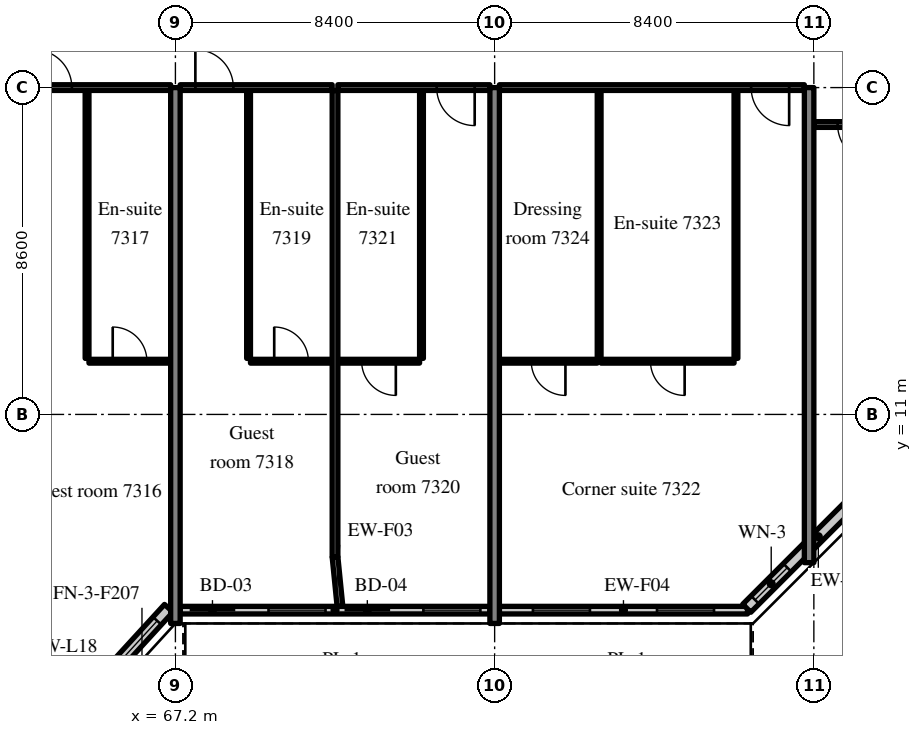
"""IFC4 building model, lengths in metres.
Left out: names, types, materials, properties, quantities, classifications, styles, units other than length and angle.
Written with IfcOpenShell. Run it as: python <this file> out.ifc"""

import sys

from ifc_helpers import new_model, si_unit, direction, frame, frame_2d, origin, place, context, subcontext, project, spatial, rectangle, extrude, source, transform, mapped, element, fill, save


model = new_model("IFC4")
c1 = context("Model", 3, precision=1e-05, world=origin(), true_north=direction((0.0, 1.0)))
c2 = subcontext(c1, "Body", "Model", "MODEL_VIEW")
j1 = project(units=[si_unit("LENGTHUNIT", "METRE"), si_unit("PLANEANGLEUNIT", "RADIAN")], contexts=[c1])
p1 = place(None, origin())
s1 = spatial("IfcSite", under=j1, at=p1, CompositionType="ELEMENT")
p2 = place(p1, origin())
s2 = spatial("IfcBuilding", under=s1, at=p2, CompositionType="ELEMENT")
p3 = place(p2, frame((0.0, 0.0, 305.7)))
s3 = spatial("IfcBuildingStorey", under=s2, at=p3, CompositionType="ELEMENT", Elevation=305.7)
m1 = source(origin(), c2, "Body", "SweptSolid", [
    extrude(rectangle(XDim=14.1, YDim=0.25, at=frame_2d((7.05, 0.0))), origin(), (0.0, 0.0, 1.0), 3.72),
])
for number, where, z_axis, x_axis in (
    (1, (67.2, 5.5, 0.0), (0.0, 0.0, 1.0), (0.0, 1.0, 0.0)),
    (2, (75.6, 5.5, 0.0), (0.0, 0.0, 1.0), (0.0, 1.0, 0.0)),
):
    element("IfcWall", number, at=place(p3, frame(where, z_axis=z_axis, x_axis=x_axis)), inside=s3, PredefinedType="SHEAR", context=c2, shape_type="MappedRepresentation", body=[
        mapped(m1, transform((0.0, 0.0, 0.0), scale=1.0)),
    ])
m2 = source(origin(), c2, "Body", "SweptSolid", [
    extrude(rectangle(XDim=12.5, YDim=0.25, at=frame_2d((6.25, 0.0))), origin(), (0.0, 0.0, 1.0), 3.72),
])
p4 = place(p3, frame((83.875, 7.1, 0.0), z_axis=(0.0, 0.0, 1.0), x_axis=(0.0, 1.0, 0.0)))
e3 = element("IfcWall", 3, at=p4, inside=s3, PredefinedType="SHEAR", context=c2, shape_type="MappedRepresentation", body=[
    mapped(m2, transform((0.0, 0.0, 0.0), scale=1.0)),
])
m3 = source(origin(), c2, "Body", "SweptSolid", [
    extrude(rectangle(XDim=2.398, YDim=0.3, at=frame_2d((1.199, 0.0))), origin(), (0.0, 0.0, 1.0), 3.72),
])
p5 = place(p3, frame((65.404, 4.131, 0.0), z_axis=(0.0, 0.0, 1.0), x_axis=(0.675374189419, 0.737475222815, 0.0)))
e4 = element("IfcWall", 4, at=p5, inside=s3, PredefinedType="SOLIDWALL", context=c2, shape_type="MappedRepresentation", body=[
    mapped(m3, transform((0.0, 0.0, 0.0), scale=1.0)),
])
m4 = source(origin(), c2, "Body", "SweptSolid", [
    extrude(rectangle(XDim=1.5, YDim=2.0, at=frame_2d((0.75, 1.0))), frame((0.0, 0.16, 0.0), z_axis=(0.0, -1.0, 0.0), x_axis=(1.0, 0.0, 0.0)), (0.0, 0.0, 1.0), 0.32),
])
p6 = place(p5, frame((0.449, 0.0, 0.9)))
e5 = element("IfcOpeningElement", 5, at=p6, cuts=e4, PredefinedType="OPENING", context=c2, shape_type="MappedRepresentation", body=[
    mapped(m4, transform((0.0, 0.0, 0.0), scale=1.0)),
])
m5 = source(origin(), c2, "Body", "SweptSolid", [
    extrude(rectangle(XDim=8.15, YDim=0.2, at=frame_2d((4.075, 0.0))), origin(), (0.0, 0.0, 1.0), 3.17),
])
p7 = place(p3, frame((67.325, 5.85, 0.0), z_axis=(0.0, 0.0, 1.0), x_axis=(1.0, 0.0, 0.0)))
e6 = element("IfcWall", 6, at=p7, inside=s3, PredefinedType="SOLIDWALL", context=c2, shape_type="MappedRepresentation", body=[
    mapped(m5, transform((0.0, 0.0, 0.0), scale=1.0)),
])
m6 = source(origin(), c2, "Body", "SweptSolid", [
    extrude(rectangle(XDim=1.2, YDim=2.4, at=frame_2d((0.6, 1.2))), frame((0.0, 0.11, 0.0), z_axis=(0.0, -1.0, 0.0), x_axis=(1.0, 0.0, 0.0)), (0.0, 0.0, 1.0), 0.22),
])
p8 = place(p7, frame((0.25, 0.0, 0.0)))
e7 = element("IfcOpeningElement", 7, at=p8, cuts=e6, PredefinedType="OPENING", context=c2, shape_type="MappedRepresentation", body=[
    mapped(m6, transform((0.0, 0.0, 0.0), scale=1.0)),
])
m7 = source(origin(), c2, "Body", "SweptSolid", [
    extrude(rectangle(XDim=1.5, YDim=1.5, at=frame_2d((0.75, 0.75))), frame((0.0, 0.11, 0.0), z_axis=(0.0, -1.0, 0.0), x_axis=(1.0, 0.0, 0.0)), (0.0, 0.0, 1.0), 0.22),
])
p9 = place(p7, frame((2.325, 0.0, 0.9)))
e8 = element("IfcOpeningElement", 8, at=p9, cuts=e6, PredefinedType="OPENING", context=c2, shape_type="MappedRepresentation", body=[
    mapped(m7, transform((0.0, 0.0, 0.0), scale=1.0)),
])
p10 = place(p7, frame((4.325, 0.0, 0.0)))
e9 = element("IfcOpeningElement", 9, at=p10, cuts=e6, PredefinedType="OPENING", context=c2, shape_type="MappedRepresentation", body=[
    mapped(m6, transform((0.0, 0.0, 0.0), scale=1.0)),
])
p11 = place(p7, frame((6.4, 0.0, 0.9)))
e10 = element("IfcOpeningElement", 10, at=p11, cuts=e6, PredefinedType="OPENING", context=c2, shape_type="MappedRepresentation", body=[
    mapped(m7, transform((0.0, 0.0, 0.0), scale=1.0)),
])
m8 = source(origin(), c2, "Body", "SweptSolid", [
    extrude(rectangle(XDim=6.53, YDim=0.2, at=frame_2d((3.265, 0.0))), origin(), (0.0, 0.0, 1.0), 3.17),
])
p12 = place(p3, frame((75.725, 5.85, 0.0), z_axis=(0.0, 0.0, 1.0), x_axis=(1.0, 0.0, 0.0)))
e11 = element("IfcWall", 11, at=p12, inside=s3, PredefinedType="SOLIDWALL", context=c2, shape_type="MappedRepresentation", body=[
    mapped(m8, transform((0.0, 0.0, 0.0), scale=1.0)),
])
p13 = place(p12, frame((0.883, 0.0, 0.9)))
e12 = element("IfcOpeningElement", 12, at=p13, cuts=e11, PredefinedType="OPENING", context=c2, shape_type="MappedRepresentation", body=[
    mapped(m7, transform((0.0, 0.0, 0.0), scale=1.0)),
])
p14 = place(p12, frame((4.147, 0.0, 0.9)))
e13 = element("IfcOpeningElement", 13, at=p14, cuts=e11, PredefinedType="OPENING", context=c2, shape_type="MappedRepresentation", body=[
    mapped(m7, transform((0.0, 0.0, 0.0), scale=1.0)),
])
m9 = source(origin(), c2, "Body", "SweptSolid", [
    extrude(rectangle(XDim=5.326, YDim=0.3, at=frame_2d((2.663, 0.0))), origin(), (0.0, 0.0, 1.0), 3.72),
])
p15 = place(p3, frame((82.234, 5.9, 0.0), z_axis=(0.0, 0.0, 1.0), x_axis=(0.707083859269, 0.707129702361, 0.0)))
e14 = element("IfcWall", 14, at=p15, inside=s3, PredefinedType="SOLIDWALL", context=c2, shape_type="MappedRepresentation", body=[
    mapped(m9, transform((0.0, 0.0, 0.0), scale=1.0)),
])
m10 = source(origin(), c2, "Body", "SweptSolid", [
    extrude(rectangle(XDim=1.2, YDim=1.5, at=frame_2d((0.6, 0.75))), frame((0.0, 0.16, 0.0), z_axis=(0.0, -1.0, 0.0), x_axis=(1.0, 0.0, 0.0)), (0.0, 0.0, 1.0), 0.32),
])
p16 = place(p15, frame((0.31, 0.0, 0.9)))
e15 = element("IfcOpeningElement", 15, at=p16, cuts=e14, PredefinedType="OPENING", context=c2, shape_type="MappedRepresentation", body=[
    mapped(m10, transform((0.0, 0.0, 0.0), scale=1.0)),
])
m11 = source(origin(), c2, "Body", "SweptSolid", [
    extrude(rectangle(XDim=7.05, YDim=0.1, at=frame_2d((3.525, 0.0))), origin(), (0.0, 0.0, 1.0), 3.72),
])
p17 = place(p3, frame((64.875, 12.475, 0.0), z_axis=(0.0, 0.0, 1.0), x_axis=(0.0, 1.0, 0.0)))
e16 = element("IfcWall", 16, at=p17, inside=s3, PredefinedType="PARTITIONING", context=c2, shape_type="MappedRepresentation", body=[
    mapped(m11, transform((0.0, 0.0, 0.0), scale=1.0)),
])
m12 = source(origin(), c2, "Body", "SweptSolid", [
    extrude(rectangle(XDim=2.15, YDim=0.1, at=frame_2d((1.075, 0.0))), origin(), (0.0, 0.0, 1.0), 3.72),
])
p18 = place(p3, frame((64.925, 12.4, 0.0), z_axis=(0.0, 0.0, 1.0), x_axis=(1.0, 0.0, 0.0)))
e17 = element("IfcWall", 17, at=p18, inside=s3, PredefinedType="PARTITIONING", context=c2, shape_type="MappedRepresentation", body=[
    mapped(m12, transform((0.0, 0.0, 0.0), scale=1.0)),
])
m13 = source(origin(), c2, "Body", "SweptSolid", [
    extrude(rectangle(XDim=0.9, YDim=2.1, at=frame_2d((0.45, 1.05))), frame((0.0, 0.06, 0.0), z_axis=(0.0, -1.0, 0.0), x_axis=(1.0, 0.0, 0.0)), (0.0, 0.0, 1.0), 0.12),
])
p19 = place(p18, frame((0.625, 0.0, 0.0)))
e18 = element("IfcOpeningElement", 18, at=p19, cuts=e17, PredefinedType="OPENING", context=c2, shape_type="MappedRepresentation", body=[
    mapped(m13, transform((0.0, 0.0, 0.0), scale=1.0)),
])
m14 = source(origin(), c2, "Body", "SweptSolid", [
    extrude(rectangle(XDim=4.0, YDim=0.15, at=frame_2d((2.0, 0.0))), origin(), (0.0, 0.0, 1.0), 3.02),
])
p20 = place(p3, frame((63.075, 19.6, 0.0), z_axis=(0.0, 0.0, 1.0), x_axis=(1.0, 0.0, 0.0)))
e19 = element("IfcWall", 19, at=p20, inside=s3, PredefinedType="PARTITIONING", context=c2, shape_type="MappedRepresentation", body=[
    mapped(m14, transform((0.0, 0.0, 0.0), scale=1.0)),
])
m15 = source(origin(), c2, "Body", "SweptSolid", [
    extrude(rectangle(XDim=1.0, YDim=2.1, at=frame_2d((0.5, 1.05))), frame((0.0, 0.085, 0.0), z_axis=(0.0, -1.0, 0.0), x_axis=(1.0, 0.0, 0.0)), (0.0, 0.0, 1.0), 0.17),
])
p21 = place(p20, frame((0.4, 0.0, 0.0)))
e20 = element("IfcOpeningElement", 20, at=p21, cuts=e19, PredefinedType="OPENING", context=c2, shape_type="MappedRepresentation", body=[
    mapped(m15, transform((0.0, 0.0, 0.0), scale=1.0)),
])
p22 = place(p3, frame((69.125, 12.475, 0.0), z_axis=(0.0, 0.0, 1.0), x_axis=(0.0, 1.0, 0.0)))
e21 = element("IfcWall", 21, at=p22, inside=s3, PredefinedType="PARTITIONING", context=c2, shape_type="MappedRepresentation", body=[
    mapped(m11, transform((0.0, 0.0, 0.0), scale=1.0)),
])
p23 = place(p3, frame((69.175, 12.4, 0.0), z_axis=(0.0, 0.0, 1.0), x_axis=(1.0, 0.0, 0.0)))
e22 = element("IfcWall", 22, at=p23, inside=s3, PredefinedType="PARTITIONING", context=c2, shape_type="MappedRepresentation", body=[
    mapped(m12, transform((0.0, 0.0, 0.0), scale=1.0)),
])
p24 = place(p23, frame((0.625, 0.0, 0.0)))
e23 = element("IfcOpeningElement", 23, at=p24, cuts=e22, PredefinedType="OPENING", context=c2, shape_type="MappedRepresentation", body=[
    mapped(m13, transform((0.0, 0.0, 0.0), scale=1.0)),
])
p25 = place(p3, frame((67.325, 19.6, 0.0), z_axis=(0.0, 0.0, 1.0), x_axis=(1.0, 0.0, 0.0)))
e24 = element("IfcWall", 24, at=p25, inside=s3, PredefinedType="PARTITIONING", context=c2, shape_type="MappedRepresentation", body=[
    mapped(m14, transform((0.0, 0.0, 0.0), scale=1.0)),
])
p26 = place(p25, frame((0.4, 0.0, 0.0)))
e25 = element("IfcOpeningElement", 25, at=p26, cuts=e24, PredefinedType="OPENING", context=c2, shape_type="MappedRepresentation", body=[
    mapped(m15, transform((0.0, 0.0, 0.0), scale=1.0)),
])
p27 = place(p3, frame((73.675, 12.475, 0.0), z_axis=(0.0, 0.0, 1.0), x_axis=(0.0, 1.0, 0.0)))
e26 = element("IfcWall", 26, at=p27, inside=s3, PredefinedType="PARTITIONING", context=c2, shape_type="MappedRepresentation", body=[
    mapped(m11, transform((0.0, 0.0, 0.0), scale=1.0)),
])
p28 = place(p3, frame((71.475, 12.4, 0.0), z_axis=(0.0, 0.0, 1.0), x_axis=(1.0, 0.0, 0.0)))
e27 = element("IfcWall", 27, at=p28, inside=s3, PredefinedType="PARTITIONING", context=c2, shape_type="MappedRepresentation", body=[
    mapped(m12, transform((0.0, 0.0, 0.0), scale=1.0)),
])
p29 = place(p28, frame((0.625, 0.0, 0.0)))
e28 = element("IfcOpeningElement", 28, at=p29, cuts=e27, PredefinedType="OPENING", context=c2, shape_type="MappedRepresentation", body=[
    mapped(m13, transform((0.0, 0.0, 0.0), scale=1.0)),
])
p30 = place(p3, frame((71.475, 19.6, 0.0), z_axis=(0.0, 0.0, 1.0), x_axis=(1.0, 0.0, 0.0)))
e29 = element("IfcWall", 29, at=p30, inside=s3, PredefinedType="PARTITIONING", context=c2, shape_type="MappedRepresentation", body=[
    mapped(m14, transform((0.0, 0.0, 0.0), scale=1.0)),
])
p31 = place(p30, frame((2.6, 0.0, 0.0)))
e30 = element("IfcOpeningElement", 30, at=p31, cuts=e29, PredefinedType="OPENING", context=c2, shape_type="MappedRepresentation", body=[
    mapped(m15, transform((0.0, 0.0, 0.0), scale=1.0)),
])
m16 = source(origin(), c2, "Body", "SweptSolid", [
    extrude(rectangle(XDim=12.275, YDim=0.15, at=frame_2d((6.137, 0.0))), origin(), (0.0, 0.0, 1.0), 3.72),
])
p32 = place(p3, frame((71.4, 7.25, 0.0), z_axis=(0.0, 0.0, 1.0), x_axis=(0.0, 1.0, 0.0)))
e31 = element("IfcWall", 31, at=p32, inside=s3, PredefinedType="PARTITIONING", context=c2, shape_type="MappedRepresentation", body=[
    mapped(m16, transform((0.0, 0.0, 0.0), scale=1.0)),
])
for number, where, z_axis, x_axis in (
    (32, (81.95, 12.475, 0.0), (0.0, 0.0, 1.0), (0.0, 1.0, 0.0)),
    (33, (78.35, 12.475, 0.0), (0.0, 0.0, 1.0), (0.0, 1.0, 0.0)),
):
    element("IfcWall", number, at=place(p3, frame(where, z_axis=z_axis, x_axis=x_axis)), inside=s3, PredefinedType="PARTITIONING", context=c2, shape_type="MappedRepresentation", body=[
        mapped(m11, transform((0.0, 0.0, 0.0), scale=1.0)),
    ])
m17 = source(origin(), c2, "Body", "SweptSolid", [
    extrude(rectangle(XDim=3.5, YDim=0.1, at=frame_2d((1.75, 0.0))), origin(), (0.0, 0.0, 1.0), 3.72),
])
p33 = place(p3, frame((78.4, 12.4, 0.0), z_axis=(0.0, 0.0, 1.0), x_axis=(1.0, 0.0, 0.0)))
e34 = element("IfcWall", 34, at=p33, inside=s3, PredefinedType="PARTITIONING", context=c2, shape_type="MappedRepresentation", body=[
    mapped(m17, transform((0.0, 0.0, 0.0), scale=1.0)),
])
p34 = place(p33, frame((1.3, 0.0, 0.0)))
e35 = element("IfcOpeningElement", 35, at=p34, cuts=e34, PredefinedType="OPENING", context=c2, shape_type="MappedRepresentation", body=[
    mapped(m13, transform((0.0, 0.0, 0.0), scale=1.0)),
])
m18 = source(origin(), c2, "Body", "SweptSolid", [
    extrude(rectangle(XDim=2.575, YDim=0.1, at=frame_2d((1.288, 0.0))), origin(), (0.0, 0.0, 1.0), 3.72),
])
p35 = place(p3, frame((75.725, 12.4, 0.0), z_axis=(0.0, 0.0, 1.0), x_axis=(1.0, 0.0, 0.0)))
e36 = element("IfcWall", 36, at=p35, inside=s3, PredefinedType="PARTITIONING", context=c2, shape_type="MappedRepresentation", body=[
    mapped(m18, transform((0.0, 0.0, 0.0), scale=1.0)),
])
p36 = place(p35, frame((0.838, 0.0, 0.0)))
e37 = element("IfcOpeningElement", 37, at=p36, cuts=e36, PredefinedType="OPENING", context=c2, shape_type="MappedRepresentation", body=[
    mapped(m13, transform((0.0, 0.0, 0.0), scale=1.0)),
])
m19 = source(origin(), c2, "Body", "SweptSolid", [
    extrude(rectangle(XDim=8.025, YDim=0.15, at=frame_2d((4.012, 0.0))), origin(), (0.0, 0.0, 1.0), 3.02),
])
p37 = place(p3, frame((75.725, 19.6, 0.0), z_axis=(0.0, 0.0, 1.0), x_axis=(1.0, 0.0, 0.0)))
e38 = element("IfcWall", 38, at=p37, inside=s3, PredefinedType="PARTITIONING", context=c2, shape_type="MappedRepresentation", body=[
    mapped(m19, transform((0.0, 0.0, 0.0), scale=1.0)),
])
p38 = place(p37, frame((6.625, 0.0, 0.0)))
e39 = element("IfcOpeningElement", 39, at=p38, cuts=e38, PredefinedType="OPENING", context=c2, shape_type="MappedRepresentation", body=[
    mapped(m15, transform((0.0, 0.0, 0.0), scale=1.0)),
])
m20 = source(origin(), c2, "Body", "SweptSolid", [
    extrude(rectangle(XDim=1.9, YDim=0.15, at=frame_2d((0.95, 0.0))), origin(), (0.0, 0.0, 1.0), 3.02),
])
p39 = place(p3, frame((84.0, 18.628, 0.0), z_axis=(0.0, 0.0, 1.0), x_axis=(1.0, 0.0, 0.0)))
e40 = element("IfcWall", 40, at=p39, inside=s3, PredefinedType="PARTITIONING", context=c2, shape_type="MappedRepresentation", body=[
    mapped(m20, transform((0.0, 0.0, 0.0), scale=1.0)),
])
p40 = place(p39, frame((0.625, 0.0, 0.0)))
e41 = element("IfcOpeningElement", 41, at=p40, cuts=e40, PredefinedType="OPENING", context=c2, shape_type="MappedRepresentation", body=[
    mapped(m15, transform((0.0, 0.0, 0.0), scale=1.0)),
])
m21 = source(origin(), c2, "Body", "SweptSolid", [
    extrude(rectangle(XDim=1.307, YDim=0.15, at=frame_2d((0.653, 0.0))), origin(), (0.0, 0.0, 1.0), 3.72),
])
p41 = place(p3, frame((71.53, 5.95, 0.0), z_axis=(0.0, 0.0, 1.0), x_axis=(-0.099596223396, 0.99502793543, 0.0)))
e42 = element("IfcWall", 42, at=p41, inside=s3, PredefinedType="PARTITIONING", context=c2, shape_type="MappedRepresentation", body=[
    mapped(m21, transform((0.0, 0.0, 0.0), scale=1.0)),
])
m22 = source(origin(), c2, "Body", "SweptSolid", [
    extrude(rectangle(XDim=1.5, YDim=2.0, at=frame_2d((0.75, 1.0))), frame((0.0, 0.03, 0.0), z_axis=(0.0, -1.0, 0.0), x_axis=(1.0, 0.0, 0.0)), (0.0, 0.0, 1.0), 0.06),
])
p42 = place(p6, origin())
e43 = element("IfcWindow", 43, at=p42, inside=s3, PartitioningType="SINGLE_PANEL", PredefinedType="WINDOW", context=c2, shape_type="MappedRepresentation", body=[
    mapped(m22, transform((0.0, 0.0, 0.0), scale=1.0)),
])
fill(e5, e43)
m23 = source(origin(), c2, "Body", "SweptSolid", [
    extrude(rectangle(XDim=1.2, YDim=2.4, at=frame_2d((0.6, 1.2))), frame((0.0, 0.025, 0.0), z_axis=(0.0, -1.0, 0.0), x_axis=(1.0, 0.0, 0.0)), (0.0, 0.0, 1.0), 0.05),
])
p43 = place(p8, origin())
e44 = element("IfcDoor", 44, at=p43, inside=s3, OperationType="SLIDING_TO_LEFT", PredefinedType="DOOR", context=c2, shape_type="MappedRepresentation", body=[
    mapped(m23, transform((0.0, 0.0, 0.0), scale=1.0)),
])
fill(e7, e44)
m24 = source(origin(), c2, "Body", "SweptSolid", [
    extrude(rectangle(XDim=1.5, YDim=1.5, at=frame_2d((0.75, 0.75))), frame((0.0, 0.03, 0.0), z_axis=(0.0, -1.0, 0.0), x_axis=(1.0, 0.0, 0.0)), (0.0, 0.0, 1.0), 0.06),
])
p44 = place(p9, origin())
e45 = element("IfcWindow", 45, at=p44, inside=s3, PartitioningType="SINGLE_PANEL", PredefinedType="WINDOW", context=c2, shape_type="MappedRepresentation", body=[
    mapped(m24, transform((0.0, 0.0, 0.0), scale=1.0)),
])
fill(e8, e45)
p45 = place(p10, origin())
e46 = element("IfcDoor", 46, at=p45, inside=s3, OperationType="SLIDING_TO_RIGHT", PredefinedType="DOOR", context=c2, shape_type="MappedRepresentation", body=[
    mapped(m23, transform((0.0, 0.0, 0.0), scale=1.0)),
])
fill(e9, e46)
p46 = place(p11, origin())
e47 = element("IfcWindow", 47, at=p46, inside=s3, PartitioningType="SINGLE_PANEL", PredefinedType="WINDOW", context=c2, shape_type="MappedRepresentation", body=[
    mapped(m24, transform((0.0, 0.0, 0.0), scale=1.0)),
])
fill(e10, e47)
p47 = place(p13, origin())
e48 = element("IfcWindow", 48, at=p47, inside=s3, PartitioningType="SINGLE_PANEL", PredefinedType="WINDOW", context=c2, shape_type="MappedRepresentation", body=[
    mapped(m24, transform((0.0, 0.0, 0.0), scale=1.0)),
])
fill(e12, e48)
p48 = place(p14, origin())
e49 = element("IfcWindow", 49, at=p48, inside=s3, PartitioningType="SINGLE_PANEL", PredefinedType="WINDOW", context=c2, shape_type="MappedRepresentation", body=[
    mapped(m24, transform((0.0, 0.0, 0.0), scale=1.0)),
])
fill(e13, e49)
m25 = source(origin(), c2, "Body", "SweptSolid", [
    extrude(rectangle(XDim=1.2, YDim=1.5, at=frame_2d((0.6, 0.75))), frame((0.0, 0.03, 0.0), z_axis=(0.0, -1.0, 0.0), x_axis=(1.0, 0.0, 0.0)), (0.0, 0.0, 1.0), 0.06),
])
p49 = place(p16, origin())
e50 = element("IfcWindow", 50, at=p49, inside=s3, PartitioningType="SINGLE_PANEL", PredefinedType="WINDOW", context=c2, shape_type="MappedRepresentation", body=[
    mapped(m25, transform((0.0, 0.0, 0.0), scale=1.0)),
])
fill(e15, e50)
m26 = source(origin(), c2, "Body", "SweptSolid", [
    extrude(rectangle(XDim=0.9, YDim=2.1, at=frame_2d((0.45, 1.05))), frame((0.0, 0.025, 0.0), z_axis=(0.0, -1.0, 0.0), x_axis=(1.0, 0.0, 0.0)), (0.0, 0.0, 1.0), 0.05),
])
p50 = place(p19, origin())
e51 = element("IfcDoor", 51, at=p50, inside=s3, OperationType="SINGLE_SWING_LEFT", PredefinedType="DOOR", context=c2, shape_type="MappedRepresentation", body=[
    mapped(m26, transform((0.0, 0.0, 0.0), scale=1.0)),
])
fill(e18, e51)
m27 = source(origin(), c2, "Body", "SweptSolid", [
    extrude(rectangle(XDim=1.0, YDim=2.1, at=frame_2d((0.5, 1.05))), frame((0.0, 0.025, 0.0), z_axis=(0.0, -1.0, 0.0), x_axis=(1.0, 0.0, 0.0)), (0.0, 0.0, 1.0), 0.05),
])
p51 = place(p21, origin())
e52 = element("IfcDoor", 52, at=p51, inside=s3, OperationType="SINGLE_SWING_LEFT", PredefinedType="DOOR", context=c2, shape_type="MappedRepresentation", body=[
    mapped(m27, transform((0.0, 0.0, 0.0), scale=1.0)),
])
fill(e20, e52)
p52 = place(p24, origin())
e53 = element("IfcDoor", 53, at=p52, inside=s3, OperationType="SINGLE_SWING_LEFT", PredefinedType="DOOR", context=c2, shape_type="MappedRepresentation", body=[
    mapped(m26, transform((0.0, 0.0, 0.0), scale=1.0)),
])
fill(e23, e53)
p53 = place(p26, origin())
e54 = element("IfcDoor", 54, at=p53, inside=s3, OperationType="SINGLE_SWING_LEFT", PredefinedType="DOOR", context=c2, shape_type="MappedRepresentation", body=[
    mapped(m27, transform((0.0, 0.0, 0.0), scale=1.0)),
])
fill(e25, e54)
p54 = place(p29, origin())
e55 = element("IfcDoor", 55, at=p54, inside=s3, OperationType="SINGLE_SWING_RIGHT", PredefinedType="DOOR", context=c2, shape_type="MappedRepresentation", body=[
    mapped(m26, transform((0.0, 0.0, 0.0), scale=1.0)),
])
fill(e28, e55)
p55 = place(p31, origin())
e56 = element("IfcDoor", 56, at=p55, inside=s3, OperationType="SINGLE_SWING_RIGHT", PredefinedType="DOOR", context=c2, shape_type="MappedRepresentation", body=[
    mapped(m27, transform((0.0, 0.0, 0.0), scale=1.0)),
])
fill(e30, e56)
p56 = place(p34, origin())
e57 = element("IfcDoor", 57, at=p56, inside=s3, OperationType="SINGLE_SWING_RIGHT", PredefinedType="DOOR", context=c2, shape_type="MappedRepresentation", body=[
    mapped(m26, transform((0.0, 0.0, 0.0), scale=1.0)),
])
fill(e35, e57)
p57 = place(p36, origin())
e58 = element("IfcDoor", 58, at=p57, inside=s3, OperationType="SINGLE_SWING_RIGHT", PredefinedType="DOOR", context=c2, shape_type="MappedRepresentation", body=[
    mapped(m26, transform((0.0, 0.0, 0.0), scale=1.0)),
])
fill(e37, e58)
p58 = place(p38, origin())
e59 = element("IfcDoor", 59, at=p58, inside=s3, OperationType="SINGLE_SWING_RIGHT", PredefinedType="DOOR", context=c2, shape_type="MappedRepresentation", body=[
    mapped(m27, transform((0.0, 0.0, 0.0), scale=1.0)),
])
fill(e39, e59)
p59 = place(p40, origin())
e60 = element("IfcDoor", 60, at=p59, inside=s3, OperationType="SINGLE_SWING_RIGHT", PredefinedType="DOOR", context=c2, shape_type="MappedRepresentation", body=[
    mapped(m27, transform((0.0, 0.0, 0.0), scale=1.0)),
])
fill(e41, e60)
save(model, sys.argv[1])
